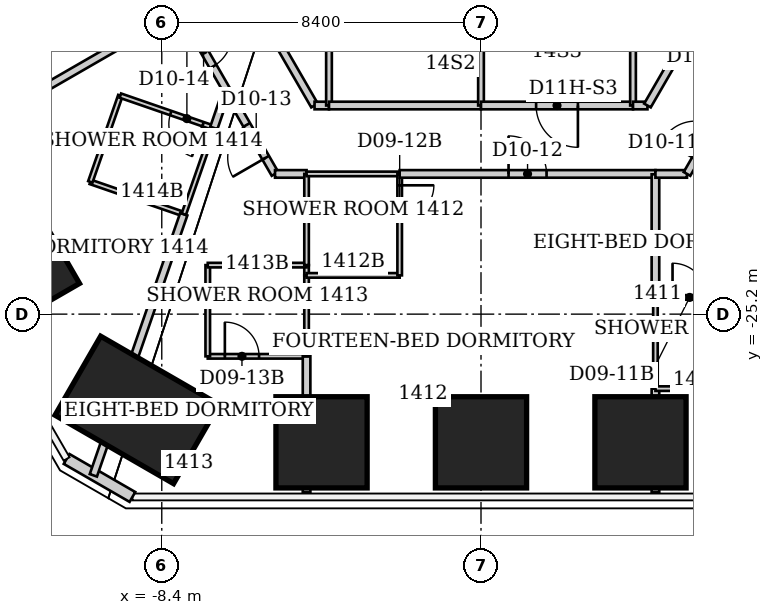
"""IFC4 building model, lengths in metres.
Left out: names, types, materials, properties, quantities, classifications, styles, units other than length and angle.
Written with IfcOpenShell. Run it as: python <this file> out.ifc"""

import sys

from ifc_helpers import new_model, si_unit, direction, frame, frame_2d, origin, origin_2d, place, context, subcontext, project, spatial, rectangle, extrude, element, fill, save


model = new_model("IFC4")
c1 = context("Model", 3, precision=1e-05, world=origin(), true_north=direction((0.0, 1.0)))
c2 = subcontext(c1, "Body", "Model", "MODEL_VIEW")
j1 = project(units=[si_unit("LENGTHUNIT", "METRE"), si_unit("PLANEANGLEUNIT", "RADIAN")], contexts=[c1])
p1 = place(None, origin())
s1 = spatial("IfcSite", under=j1, at=p1, CompositionType="ELEMENT")
p2 = place(p1, origin())
s2 = spatial("IfcBuilding", under=s1, at=p2, CompositionType="ELEMENT")
p3 = place(p2, frame((0.0, 0.0, 61.0)))
s3 = spatial("IfcBuildingStorey", under=s2, at=p3, CompositionType="ELEMENT", Elevation=61.0)
p4 = place(p3, frame((4.196, -28.573, 0.0), z_axis=(-0.00673864507, 0.045886964046, 0.998923909611), x_axis=(-0.00031485931, -0.998946638466, 0.045885884117)))
e1 = element("IfcColumn", 1, at=p4, inside=s3, PredefinedType="COLUMN", context=c2, shape_type="SweptSolid", body=[
    extrude(rectangle(XDim=2.4, YDim=2.4, at=origin_2d()), origin(), (0.0, 0.0, 1.0), 3.804),
])
p5 = place(p3, frame((0.0, -28.574, 0.0), z_axis=(0.0, 0.04582396176, 0.998949530521), x_axis=(0.0, -0.998949530521, 0.04582396176)))
e2 = element("IfcColumn", 2, at=p5, inside=s3, PredefinedType="COLUMN", context=c2, shape_type="SweptSolid", body=[
    extrude(rectangle(XDim=2.4, YDim=2.4, at=origin_2d()), origin(), (0.0, 0.0, 1.0), 3.804),
])
p6 = place(p3, frame((-4.196, -28.573, 0.0), z_axis=(0.00673864507, 0.045886964046, 0.998923909611), x_axis=(0.00031485931, -0.998946638466, 0.045885884117)))
e3 = element("IfcColumn", 3, at=p6, inside=s3, PredefinedType="COLUMN", context=c2, shape_type="SweptSolid", body=[
    extrude(rectangle(XDim=2.4, YDim=2.4, at=origin_2d()), origin(), (0.0, 0.0, 1.0), 3.804),
])
p7 = place(p3, frame((-9.049, -27.721, 0.0), z_axis=(0.014888146492, 0.045498689063, 0.998853448904), x_axis=(-0.500473089546, -0.864484190145, 0.046837715875)))
e4 = element("IfcColumn", 4, at=p7, inside=s3, PredefinedType="COLUMN", context=c2, shape_type="SweptSolid", body=[
    extrude(rectangle(XDim=2.4, YDim=3.6, at=origin_2d()), origin(), (0.0, 0.0, 1.0), 3.804),
])
p8 = place(p3, frame((-12.205, -23.954, 0.0), z_axis=(0.019833202316, 0.039024553425, 0.999041404705), x_axis=(-0.865370758954, -0.499786352777, 0.036702195118)))
e5 = element("IfcColumn", 5, at=p8, inside=s3, PredefinedType="COLUMN", context=c2, shape_type="SweptSolid", body=[
    extrude(rectangle(XDim=2.4, YDim=2.4, at=origin_2d()), origin(), (0.0, 0.0, 1.0), 3.804),
])
p9 = place(p3, frame((-9.172, -30.011, 0.0), z_axis=(0.0, 0.0, 1.0), x_axis=(-0.866010750942, 0.50002537861, 0.0)))
e6 = element("IfcWall", 6, at=p9, inside=s3, PredefinedType="SOLIDWALL", context=c2, shape_type="SweptSolid", body=[
    extrude(rectangle(XDim=2.0, YDim=0.3, at=frame_2d((1.0, 0.0))), origin(), (0.0, 0.0, 1.0), 3.64),
])
p10 = place(p3, frame((-15.176, -21.38, 0.0), z_axis=(0.0, 0.0, 1.0), x_axis=(0.866276837306, 0.49956425127, 0.0)))
e7 = element("IfcWall", 7, at=p10, inside=s3, PredefinedType="PARTITIONING", context=c2, shape_type="SweptSolid", body=[
    extrude(rectangle(XDim=8.373, YDim=0.2, at=frame_2d((4.186, 0.0))), origin(), (0.0, 0.0, 1.0), 3.64),
])
p11 = place(p3, frame((-10.28, -21.72, 0.0), z_axis=(0.0, 0.0, 1.0), x_axis=(0.94515546045, -0.326620813149, 0.0)))
e8 = element("IfcWall", 8, at=p11, inside=s3, PredefinedType="PARTITIONING", context=c2, shape_type="SweptSolid", body=[
    extrude(rectangle(XDim=2.603, YDim=0.12, at=frame_2d((1.301, 0.0))), origin(), (0.0, 0.0, 1.0), 3.64),
])
p12 = place(p3, frame((-10.2, -29.442, 0.0), z_axis=(0.0, 0.0, 1.0), x_axis=(0.327154379454, 0.944970905374, 0.0)))
e9 = element("IfcWall", 9, at=p12, inside=s3, PredefinedType="PARTITIONING", context=c2, shape_type="SweptSolid", body=[
    extrude(rectangle(XDim=7.272, YDim=0.2, at=frame_2d((3.636, 0.0))), origin(), (0.0, 0.0, 1.0), 3.64),
])
p13 = place(p3, frame((-9.49, -19.45, 0.0), z_axis=(0.0, 0.0, 1.0), x_axis=(-0.328693963496, -0.944436487203, 0.0)))
e10 = element("IfcWall", 10, at=p13, inside=s3, PredefinedType="PARTITIONING", context=c2, shape_type="SweptSolid", body=[
    extrude(rectangle(XDim=2.404, YDim=0.12, at=frame_2d((1.202, 0.0))), origin(), (0.0, 0.0, 1.0), 3.64),
])
p14 = place(p3, frame((-7.91, -17.19, 0.0), z_axis=(0.0, 0.0, 1.0), x_axis=(0.498748634132, -0.866746675766, 0.0)))
e11 = element("IfcWall", 11, at=p14, inside=s3, PredefinedType="PARTITIONING", context=c2, shape_type="SweptSolid", body=[
    extrude(rectangle(XDim=2.446, YDim=0.2, at=frame_2d((1.223, 0.0))), origin(), (0.0, 0.0, 1.0), 3.64),
])
p15 = place(p14, frame((0.723, 0.0, 0.0)))
e12 = element("IfcOpeningElement", 12, at=p15, cuts=e11, PredefinedType="OPENING", context=c2, shape_type="SweptSolid", body=[
    extrude(rectangle(XDim=1.0, YDim=2.13, at=frame_2d((0.5, 1.065))), frame((0.0, 0.1, 0.0), z_axis=(0.0, -1.0, 0.0), x_axis=(1.0, 0.0, 0.0)), (0.0, 0.0, 1.0), 0.2),
])
p16 = place(p3, frame((-7.82, -22.57, 0.0), z_axis=(0.0, 0.0, 1.0), x_axis=(0.328693963496, 0.944436487203, 0.0)))
e13 = element("IfcWall", 13, at=p16, inside=s3, PredefinedType="PARTITIONING", context=c2, shape_type="SweptSolid", body=[
    extrude(rectangle(XDim=2.404, YDim=0.12, at=frame_2d((1.202, 0.0))), origin(), (0.0, 0.0, 1.0), 3.64),
])
p17 = place(p3, frame((-7.19, -26.31, 0.0), z_axis=(0.0, 0.0, 1.0), x_axis=(1.0, 0.0, 0.0)))
e14 = element("IfcWall", 14, at=p17, inside=s3, PredefinedType="PARTITIONING", context=c2, shape_type="SweptSolid", body=[
    extrude(rectangle(XDim=2.6, YDim=0.12, at=frame_2d((1.3, 0.0))), origin(), (0.0, 0.0, 1.0), 3.64),
])
p18 = place(p17, frame((0.45, 0.0, 0.0)))
e15 = element("IfcOpeningElement", 15, at=p18, cuts=e14, PredefinedType="OPENING", context=c2, shape_type="SweptSolid", body=[
    extrude(rectangle(XDim=0.9, YDim=2.03, at=frame_2d((0.45, 1.015))), frame((0.0, 0.06, 0.0), z_axis=(0.0, -1.0, 0.0), x_axis=(1.0, 0.0, 0.0)), (0.0, 0.0, 1.0), 0.12),
])
p19 = place(p3, frame((-7.19, -23.91, 0.0), z_axis=(0.0, 0.0, 1.0), x_axis=(0.0, -1.0, 0.0)))
e16 = element("IfcWall", 16, at=p19, inside=s3, PredefinedType="PARTITIONING", context=c2, shape_type="SweptSolid", body=[
    extrude(rectangle(XDim=2.4, YDim=0.12, at=frame_2d((1.2, 0.0))), origin(), (0.0, 0.0, 1.0), 3.64),
])
p20 = place(p3, frame((-7.03, -20.3, 0.0), z_axis=(0.0, 0.0, 1.0), x_axis=(-0.94515546045, 0.326620813149, 0.0)))
e17 = element("IfcWall", 17, at=p20, inside=s3, PredefinedType="PARTITIONING", context=c2, shape_type="SweptSolid", body=[
    extrude(rectangle(XDim=2.603, YDim=0.12, at=frame_2d((1.301, 0.0))), origin(), (0.0, 0.0, 1.0), 3.64),
])
p21 = place(p20, frame((0.3, 0.0, 0.0)))
e18 = element("IfcOpeningElement", 18, at=p21, cuts=e17, PredefinedType="OPENING", context=c2, shape_type="SweptSolid", body=[
    extrude(rectangle(XDim=0.9, YDim=2.03, at=frame_2d((0.45, 1.015))), frame((0.0, 0.06, 0.0), z_axis=(0.0, -1.0, 0.0), x_axis=(1.0, 0.0, 0.0)), (0.0, 0.0, 1.0), 0.12),
])
p22 = place(p3, frame((-7.03, -20.3, 0.0), z_axis=(0.0, 0.0, 1.0), x_axis=(0.324737408014, 0.94580421644, 0.0)))
e19 = element("IfcWall", 19, at=p22, inside=s3, PredefinedType="PARTITIONING", context=c2, shape_type="SweptSolid", body=[
    extrude(rectangle(XDim=0.937, YDim=0.2, at=frame_2d((0.468, 0.0))), origin(), (0.0, 0.0, 1.0), 3.64),
])
p23 = place(p3, frame((-6.69, -19.31, 0.0), z_axis=(0.0, 0.0, 1.0), x_axis=(0.499963722229, -0.866046347752, 0.0)))
e20 = element("IfcWall", 20, at=p23, inside=s3, PredefinedType="PARTITIONING", context=c2, shape_type="SweptSolid", body=[
    extrude(rectangle(XDim=2.54, YDim=0.2, at=frame_2d((1.27, 0.0))), origin(), (0.0, 0.0, 1.0), 3.64),
])
p24 = place(p23, frame((1.05, 0.0, 0.0)))
e21 = element("IfcOpeningElement", 21, at=p24, cuts=e20, PredefinedType="OPENING", context=c2, shape_type="SweptSolid", body=[
    extrude(rectangle(XDim=1.0, YDim=2.13, at=frame_2d((0.5, 1.065))), frame((0.0, 0.1, 0.0), z_axis=(0.0, -1.0, 0.0), x_axis=(1.0, 0.0, 0.0)), (0.0, 0.0, 1.0), 0.2),
])
p25 = place(p3, frame((-5.42, -21.51, 0.0), z_axis=(0.0, 0.0, 1.0), x_axis=(1.0, 0.0, 0.0)))
e22 = element("IfcWall", 22, at=p25, inside=s3, PredefinedType="PARTITIONING", context=c2, shape_type="SweptSolid", body=[
    extrude(rectangle(XDim=0.83, YDim=0.2, at=frame_2d((0.415, 0.0))), origin(), (0.0, 0.0, 1.0), 3.64),
])
p26 = place(p3, frame((-4.59, -29.89, 0.0), z_axis=(0.0, 0.0, 1.0), x_axis=(0.0, 1.0, 0.0)))
e23 = element("IfcWall", 23, at=p26, inside=s3, PredefinedType="PARTITIONING", context=c2, shape_type="SweptSolid", body=[
    extrude(rectangle(XDim=3.58, YDim=0.2, at=frame_2d((1.79, 0.0))), origin(), (0.0, 0.0, 1.0), 3.64),
])
p27 = place(p3, frame((-4.59, -26.31, 0.0), z_axis=(0.0, 0.0, 1.0), x_axis=(0.0, 1.0, 0.0)))
e24 = element("IfcWall", 24, at=p27, inside=s3, PredefinedType="PARTITIONING", context=c2, shape_type="SweptSolid", body=[
    extrude(rectangle(XDim=2.13, YDim=0.12, at=frame_2d((1.065, 0.0))), origin(), (0.0, 0.0, 1.0), 3.64),
])
p28 = place(p3, frame((-4.59, -24.18, 0.0), z_axis=(0.0, 0.0, 1.0), x_axis=(0.0, 1.0, 0.0)))
e25 = element("IfcWall", 25, at=p28, inside=s3, PredefinedType="PARTITIONING", context=c2, shape_type="SweptSolid", body=[
    extrude(rectangle(XDim=0.27, YDim=0.12, at=frame_2d((0.135, 0.0))), origin(), (0.0, 0.0, 1.0), 3.64),
])
p29 = place(p3, frame((-4.59, -24.18, 0.0), z_axis=(0.0, 0.0, 1.0), x_axis=(1.0, 0.0, 0.0)))
e26 = element("IfcWall", 26, at=p29, inside=s3, PredefinedType="PARTITIONING", context=c2, shape_type="SweptSolid", body=[
    extrude(rectangle(XDim=2.45, YDim=0.12, at=frame_2d((1.225, 0.0))), origin(), (0.0, 0.0, 1.0), 3.64),
])
p30 = place(p3, frame((-4.59, -23.91, 0.0), z_axis=(0.0, 0.0, 1.0), x_axis=(-1.0, 0.0, 0.0)))
e27 = element("IfcWall", 27, at=p30, inside=s3, PredefinedType="PARTITIONING", context=c2, shape_type="SweptSolid", body=[
    extrude(rectangle(XDim=2.6, YDim=0.12, at=frame_2d((1.3, 0.0))), origin(), (0.0, 0.0, 1.0), 3.64),
])
p31 = place(p3, frame((-4.59, -23.91, 0.0), z_axis=(0.0, 0.0, 1.0), x_axis=(0.0, 1.0, 0.0)))
e28 = element("IfcWall", 28, at=p31, inside=s3, PredefinedType="PARTITIONING", context=c2, shape_type="SweptSolid", body=[
    extrude(rectangle(XDim=2.4, YDim=0.12, at=frame_2d((1.2, 0.0))), origin(), (0.0, 0.0, 1.0), 3.64),
])
p32 = place(p3, frame((-4.59, -21.51, 0.0), z_axis=(0.0, 0.0, 1.0), x_axis=(1.0, 0.0, 0.0)))
e29 = element("IfcWall", 29, at=p32, inside=s3, PredefinedType="PARTITIONING", context=c2, shape_type="SweptSolid", body=[
    extrude(rectangle(XDim=2.45, YDim=0.12, at=frame_2d((1.225, 0.0))), origin(), (0.0, 0.0, 1.0), 3.64),
])
p33 = place(p3, frame((-4.38, -19.71, 0.0), z_axis=(0.0, 0.0, 1.0), x_axis=(-0.500523653757, 0.865722860984, 0.0)))
e30 = element("IfcWall", 30, at=p33, inside=s3, PredefinedType="PARTITIONING", context=c2, shape_type="SweptSolid", body=[
    extrude(rectangle(XDim=6.628, YDim=0.2, at=frame_2d((3.314, 0.0))), origin(), (0.0, 0.0, 1.0), 3.64),
])
p34 = place(p33, frame((2.764, 0.0, 0.0)))
e31 = element("IfcOpeningElement", 31, at=p34, cuts=e30, PredefinedType="OPENING", context=c2, shape_type="SweptSolid", body=[
    extrude(rectangle(XDim=1.1, YDim=2.2, at=frame_2d((0.55, 1.1))), frame((0.0, 0.1, 0.0), z_axis=(0.0, -1.0, 0.0), x_axis=(1.0, 0.0, 0.0)), (0.0, 0.0, 1.0), 0.2),
])
p35 = place(p3, frame((-4.0, -19.71, 0.0), z_axis=(0.0, 0.0, 1.0), x_axis=(-1.0, 0.0, 0.0)))
e32 = element("IfcWall", 32, at=p35, inside=s3, PredefinedType="PARTITIONING", context=c2, shape_type="SweptSolid", body=[
    extrude(rectangle(XDim=0.38, YDim=0.2, at=frame_2d((0.19, 0.0))), origin(), (0.0, 0.0, 1.0), 3.64),
])
p36 = place(p3, frame((-4.0, -14.0, 0.0), z_axis=(0.0, 0.0, 1.0), x_axis=(0.0, -1.0, 0.0)))
e33 = element("IfcWall", 33, at=p36, inside=s3, PredefinedType="PARTITIONING", context=c2, shape_type="SweptSolid", body=[
    extrude(rectangle(XDim=5.71, YDim=0.15, at=frame_2d((2.855, 0.0))), origin(), (0.0, 0.0, 1.0), 3.64),
])
p37 = place(p3, frame((-2.14, -24.18, 0.0), z_axis=(0.0, 0.0, 1.0), x_axis=(0.0, 1.0, 0.0)))
e34 = element("IfcWall", 34, at=p37, inside=s3, PredefinedType="PARTITIONING", context=c2, shape_type="SweptSolid", body=[
    extrude(rectangle(XDim=2.67, YDim=0.12, at=frame_2d((1.335, 0.0))), origin(), (0.0, 0.0, 1.0), 2.726),
])
p38 = place(p37, frame((1.47, 0.0, 0.0)))
e35 = element("IfcOpeningElement", 35, at=p38, cuts=e34, PredefinedType="OPENING", context=c2, shape_type="SweptSolid", body=[
    extrude(rectangle(XDim=0.9, YDim=2.03, at=frame_2d((0.45, 1.015))), frame((0.0, 0.06, 0.0), z_axis=(0.0, -1.0, 0.0), x_axis=(1.0, 0.0, 0.0)), (0.0, 0.0, 1.0), 0.12),
])
p39 = place(p3, frame((-2.14, -21.51, 0.0), z_axis=(0.0, 0.0, 1.0), x_axis=(1.0, 0.0, 0.0)))
e36 = element("IfcWall", 36, at=p39, inside=s3, PredefinedType="PARTITIONING", context=c2, shape_type="SweptSolid", body=[
    extrude(rectangle(XDim=6.73, YDim=0.2, at=frame_2d((3.365, 0.0))), origin(), (0.0, 0.0, 1.0), 3.64),
])
p40 = place(p39, frame((2.865, 0.0, 0.0)))
e37 = element("IfcOpeningElement", 37, at=p40, cuts=e36, PredefinedType="OPENING", context=c2, shape_type="SweptSolid", body=[
    extrude(rectangle(XDim=1.0, YDim=2.13, at=frame_2d((0.5, 1.065))), frame((0.0, 0.1, 0.0), z_axis=(0.0, -1.0, 0.0), x_axis=(1.0, 0.0, 0.0)), (0.0, 0.0, 1.0), 0.2),
])
p41 = place(p3, frame((0.0, -19.71, 0.0), z_axis=(0.0, 0.0, 1.0), x_axis=(-1.0, 0.0, 0.0)))
e38 = element("IfcWall", 38, at=p41, inside=s3, PredefinedType="PARTITIONING", context=c2, shape_type="SweptSolid", body=[
    extrude(rectangle(XDim=4.0, YDim=0.2, at=frame_2d((2.0, 0.0))), origin(), (0.0, 0.0, 1.0), 3.64),
])
p42 = place(p3, frame((0.0, -13.95, 0.0), z_axis=(0.0, 0.0, 1.0), x_axis=(0.0, -1.0, 0.0)))
e39 = element("IfcWall", 39, at=p42, inside=s3, PredefinedType="PARTITIONING", context=c2, shape_type="SweptSolid", body=[
    extrude(rectangle(XDim=5.76, YDim=0.15, at=frame_2d((2.88, 0.0))), origin(), (0.0, 0.0, 1.0), 2.86),
])
p43 = place(p3, frame((4.0, -19.71, 0.0), z_axis=(0.0, 0.0, 1.0), x_axis=(-1.0, 0.0, 0.0)))
e40 = element("IfcWall", 40, at=p43, inside=s3, PredefinedType="PARTITIONING", context=c2, shape_type="SweptSolid", body=[
    extrude(rectangle(XDim=4.0, YDim=0.2, at=frame_2d((2.0, 0.0))), origin(), (0.0, 0.0, 1.0), 3.64),
])
p44 = place(p43, frame((1.45, 0.0, 0.0)))
e41 = element("IfcOpeningElement", 41, at=p44, cuts=e40, PredefinedType="OPENING", context=c2, shape_type="SweptSolid", body=[
    extrude(rectangle(XDim=1.1, YDim=2.2, at=frame_2d((0.55, 1.1))), frame((0.0, 0.1, 0.0), z_axis=(0.0, -1.0, 0.0), x_axis=(1.0, 0.0, 0.0)), (0.0, 0.0, 1.0), 0.2),
])
p45 = place(p3, frame((4.0, -13.95, 0.0), z_axis=(0.0, 0.0, 1.0), x_axis=(0.0, -1.0, 0.0)))
e42 = element("IfcWall", 42, at=p45, inside=s3, PredefinedType="PARTITIONING", context=c2, shape_type="SweptSolid", body=[
    extrude(rectangle(XDim=5.76, YDim=0.15, at=frame_2d((2.88, 0.0))), origin(), (0.0, 0.0, 1.0), 3.64),
])
p46 = place(p3, frame((4.38, -19.71, 0.0), z_axis=(0.0, 0.0, 1.0), x_axis=(-1.0, 0.0, 0.0)))
e43 = element("IfcWall", 43, at=p46, inside=s3, PredefinedType="PARTITIONING", context=c2, shape_type="SweptSolid", body=[
    extrude(rectangle(XDim=0.38, YDim=0.2, at=frame_2d((0.19, 0.0))), origin(), (0.0, 0.0, 1.0), 3.64),
])
p47 = place(p3, frame((4.59, -29.89, 0.0), z_axis=(0.0, 0.0, 1.0), x_axis=(0.0, 1.0, 0.0)))
e44 = element("IfcWall", 44, at=p47, inside=s3, PredefinedType="PARTITIONING", context=c2, shape_type="SweptSolid", body=[
    extrude(rectangle(XDim=2.73, YDim=0.2, at=frame_2d((1.365, 0.0))), origin(), (0.0, 0.0, 1.0), 3.64),
])
p48 = place(p3, frame((4.59, -27.16, 0.0), z_axis=(0.0, 0.0, 1.0), x_axis=(0.0, 1.0, 0.0)))
e45 = element("IfcWall", 45, at=p48, inside=s3, PredefinedType="PARTITIONING", context=c2, shape_type="SweptSolid", body=[
    extrude(rectangle(XDim=2.4, YDim=0.12, at=frame_2d((1.2, 0.0))), origin(), (0.0, 0.0, 1.0), 3.64),
])
p49 = place(p3, frame((4.59, -27.16, 0.0), z_axis=(0.0, 0.0, 1.0), x_axis=(1.0, 0.0, 0.0)))
e46 = element("IfcWall", 46, at=p49, inside=s3, PredefinedType="PARTITIONING", context=c2, shape_type="SweptSolid", body=[
    extrude(rectangle(XDim=2.6, YDim=0.12, at=frame_2d((1.3, 0.0))), origin(), (0.0, 0.0, 1.0), 3.64),
])
p50 = place(p3, frame((4.59, -24.76, 0.0), z_axis=(0.0, 0.0, 1.0), x_axis=(0.0, 1.0, 0.0)))
e47 = element("IfcWall", 47, at=p50, inside=s3, PredefinedType="PARTITIONING", context=c2, shape_type="SweptSolid", body=[
    extrude(rectangle(XDim=3.24, YDim=0.2, at=frame_2d((1.62, 0.0))), origin(), (0.0, 0.0, 1.0), 3.64),
])
p51 = place(p3, frame((4.59, -21.51, 0.0), z_axis=(0.0, 0.0, 1.0), x_axis=(1.0, 0.0, 0.0)))
e48 = element("IfcWall", 48, at=p51, inside=s3, PredefinedType="PARTITIONING", context=c2, shape_type="SweptSolid", body=[
    extrude(rectangle(XDim=0.83, YDim=0.2, at=frame_2d((0.415, 0.0))), origin(), (0.0, 0.0, 1.0), 3.64),
])
p52 = place(p3, frame((5.42, -21.51, 0.0), z_axis=(0.0, 0.0, 1.0), x_axis=(0.499963722229, 0.866046347752, 0.0)))
e49 = element("IfcWall", 49, at=p52, inside=s3, PredefinedType="PARTITIONING", context=c2, shape_type="SweptSolid", body=[
    extrude(rectangle(XDim=2.54, YDim=0.2, at=frame_2d((1.27, 0.0))), origin(), (0.0, 0.0, 1.0), 3.64),
])
p53 = place(p52, frame((0.45, 0.0, 0.0)))
e50 = element("IfcOpeningElement", 50, at=p53, cuts=e49, PredefinedType="OPENING", context=c2, shape_type="SweptSolid", body=[
    extrude(rectangle(XDim=1.0, YDim=2.13, at=frame_2d((0.5, 1.065))), frame((0.0, 0.1, 0.0), z_axis=(0.0, -1.0, 0.0), x_axis=(1.0, 0.0, 0.0)), (0.0, 0.0, 1.0), 0.2),
])
p54 = place(p3, frame((7.19, -24.76, 0.0), z_axis=(0.0, 0.0, 1.0), x_axis=(-1.0, 0.0, 0.0)))
e51 = element("IfcWall", 51, at=p54, inside=s3, PredefinedType="PARTITIONING", context=c2, shape_type="SweptSolid", body=[
    extrude(rectangle(XDim=2.6, YDim=0.12, at=frame_2d((1.3, 0.0))), origin(), (0.0, 0.0, 1.0), 3.64),
])
p55 = place(p54, frame((1.25, 0.0, 0.0)))
e52 = element("IfcOpeningElement", 52, at=p55, cuts=e51, PredefinedType="OPENING", context=c2, shape_type="SweptSolid", body=[
    extrude(rectangle(XDim=0.9, YDim=2.03, at=frame_2d((0.45, 1.015))), frame((0.0, 0.06, 0.0), z_axis=(0.0, -1.0, 0.0), x_axis=(1.0, 0.0, 0.0)), (0.0, 0.0, 1.0), 0.12),
])
p56 = place(p3, frame((7.71, -13.95, 0.0), z_axis=(0.0, 0.0, 1.0), x_axis=(-0.500511113963, -0.865730110831, 0.0)))
e53 = element("IfcWall", 53, at=p56, inside=s3, PredefinedType="PARTITIONING", context=c2, shape_type="SweptSolid", body=[
    extrude(rectangle(XDim=6.653, YDim=0.2, at=frame_2d((3.327, 0.0))), origin(), (0.0, 0.0, 1.0), 3.64),
])
p57 = place(p56, frame((2.777, 0.0, 0.0)))
e54 = element("IfcOpeningElement", 54, at=p57, cuts=e53, PredefinedType="OPENING", context=c2, shape_type="SweptSolid", body=[
    extrude(rectangle(XDim=1.1, YDim=2.2, at=frame_2d((0.55, 1.1))), frame((0.0, 0.1, 0.0), z_axis=(0.0, -1.0, 0.0), x_axis=(1.0, 0.0, 0.0)), (0.0, 0.0, 1.0), 0.2),
])
p58 = place(p55, origin())
e55 = element("IfcDoor", 55, at=p58, inside=s3, OperationType="SINGLE_SWING_RIGHT", PredefinedType="DOOR", context=c2, shape_type="SweptSolid", body=[
    extrude(rectangle(XDim=0.9, YDim=2.03, at=frame_2d((0.45, 1.015))), frame((0.0, 0.025, 0.0), z_axis=(0.0, -1.0, 0.0), x_axis=(1.0, 0.0, 0.0)), (0.0, 0.0, 1.0), 0.05),
])
fill(e52, e55)
p59 = place(p40, origin())
e56 = element("IfcDoor", 56, at=p59, inside=s3, OperationType="SINGLE_SWING_LEFT", PredefinedType="DOOR", context=c2, shape_type="SweptSolid", body=[
    extrude(rectangle(XDim=1.0, YDim=2.13, at=frame_2d((0.5, 1.065))), frame((0.0, 0.025, 0.0), z_axis=(0.0, -1.0, 0.0), x_axis=(1.0, 0.0, 0.0)), (0.0, 0.0, 1.0), 0.05),
])
fill(e37, e56)
p60 = place(p38, origin())
e57 = element("IfcDoor", 57, at=p60, inside=s3, OperationType="SINGLE_SWING_RIGHT", PredefinedType="DOOR", context=c2, shape_type="SweptSolid", body=[
    extrude(rectangle(XDim=0.9, YDim=2.03, at=frame_2d((0.45, 1.015))), frame((0.0, 0.025, 0.0), z_axis=(0.0, -1.0, 0.0), x_axis=(1.0, 0.0, 0.0)), (0.0, 0.0, 1.0), 0.05),
])
fill(e35, e57)
p61 = place(p24, origin())
e58 = element("IfcDoor", 58, at=p61, inside=s3, OperationType="SINGLE_SWING_RIGHT", PredefinedType="DOOR", context=c2, shape_type="SweptSolid", body=[
    extrude(rectangle(XDim=1.0, YDim=2.13, at=frame_2d((0.5, 1.065))), frame((0.0, 0.025, 0.0), z_axis=(0.0, -1.0, 0.0), x_axis=(1.0, 0.0, 0.0)), (0.0, 0.0, 1.0), 0.05),
])
fill(e21, e58)
p62 = place(p18, origin())
e59 = element("IfcDoor", 59, at=p62, inside=s3, OperationType="SINGLE_SWING_LEFT", PredefinedType="DOOR", context=c2, shape_type="SweptSolid", body=[
    extrude(rectangle(XDim=0.9, YDim=2.03, at=frame_2d((0.45, 1.015))), frame((0.0, 0.025, 0.0), z_axis=(0.0, -1.0, 0.0), x_axis=(1.0, 0.0, 0.0)), (0.0, 0.0, 1.0), 0.05),
])
fill(e15, e59)
p63 = place(p15, origin())
e60 = element("IfcDoor", 60, at=p63, inside=s3, OperationType="SINGLE_SWING_LEFT", PredefinedType="DOOR", context=c2, shape_type="SweptSolid", body=[
    extrude(rectangle(XDim=1.0, YDim=2.13, at=frame_2d((0.5, 1.065))), frame((0.0, 0.025, 0.0), z_axis=(0.0, -1.0, 0.0), x_axis=(1.0, 0.0, 0.0)), (0.0, 0.0, 1.0), 0.05),
])
fill(e12, e60)
p64 = place(p21, origin())
e61 = element("IfcDoor", 61, at=p64, inside=s3, OperationType="SINGLE_SWING_LEFT", PredefinedType="DOOR", context=c2, shape_type="SweptSolid", body=[
    extrude(rectangle(XDim=0.9, YDim=2.03, at=frame_2d((0.45, 1.015))), frame((0.0, 0.025, 0.0), z_axis=(0.0, -1.0, 0.0), x_axis=(1.0, 0.0, 0.0)), (0.0, 0.0, 1.0), 0.05),
])
fill(e18, e61)
p65 = place(p44, origin())
e62 = element("IfcDoor", 62, at=p65, inside=s3, OperationType="SINGLE_SWING_LEFT", PredefinedType="DOOR", context=c2, shape_type="SweptSolid", body=[
    extrude(rectangle(XDim=1.1, YDim=2.2, at=frame_2d((0.55, 1.1))), frame((0.0, 0.025, 0.0), z_axis=(0.0, -1.0, 0.0), x_axis=(1.0, 0.0, 0.0)), (0.0, 0.0, 1.0), 0.05),
])
fill(e41, e62)
save(model, sys.argv[1])
